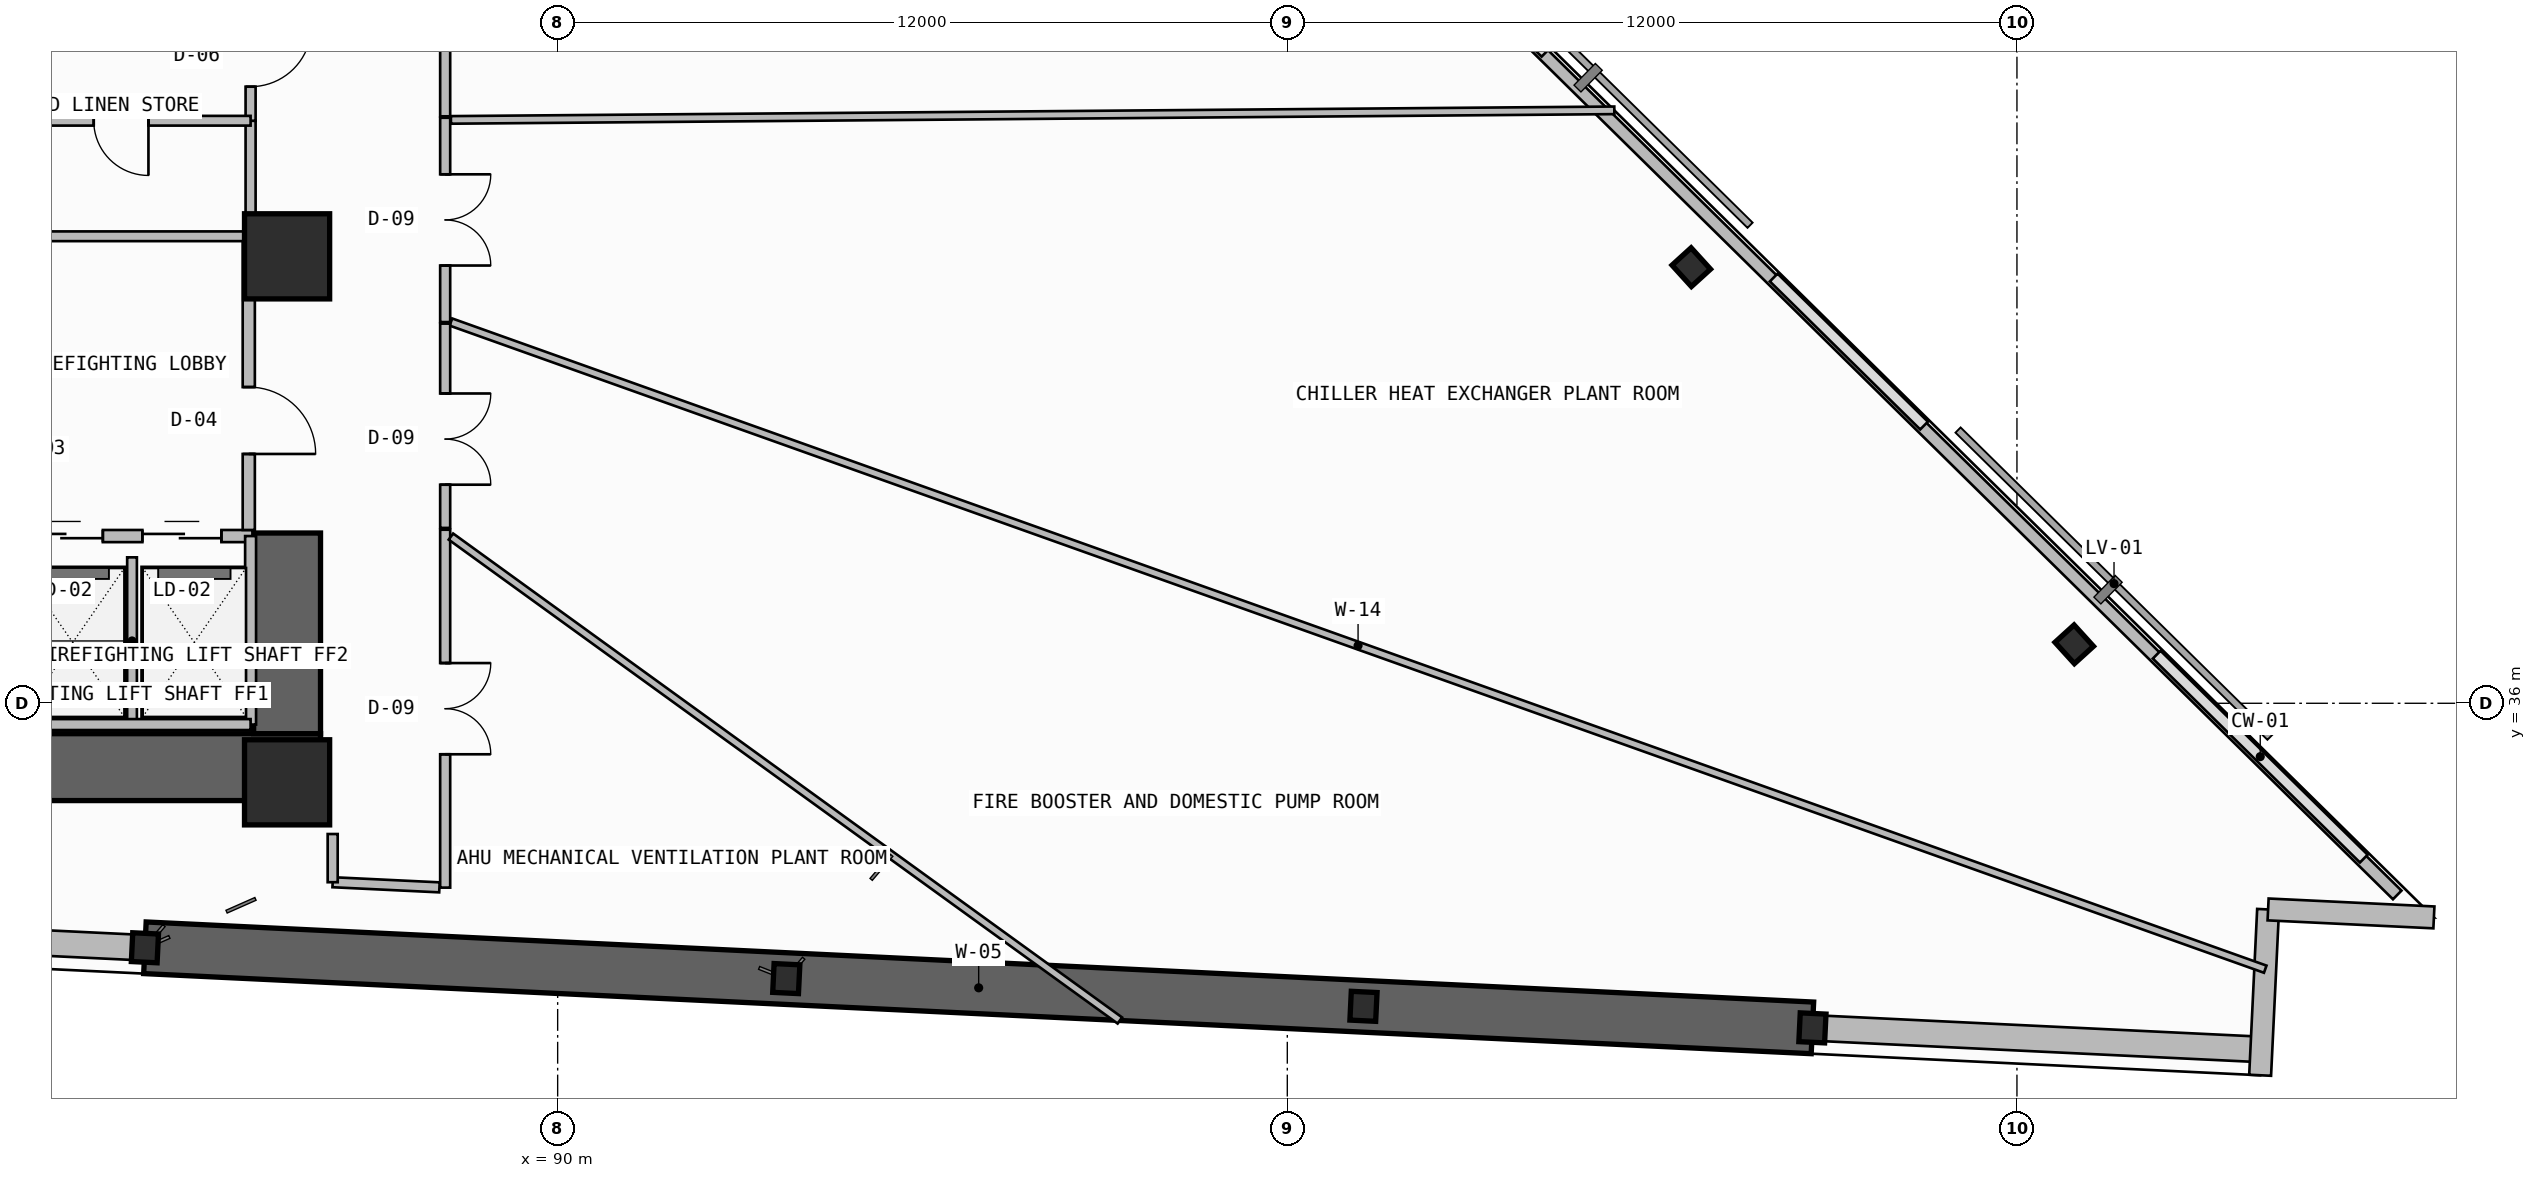
"""IFC4 building model, lengths in metres.
Left out: names, types, materials, properties, quantities, classifications, styles, units other than length and angle.
Written with IfcOpenShell. Run it as: python <this file> out.ifc"""

import sys

from ifc_helpers import new_model, si_unit, direction, frame, frame_2d, origin, origin_2d, place, context, subcontext, project, spatial, rectangle, i_section, extrude, element, fill, save


model = new_model("IFC4")
c1 = context("Model", 3, precision=1e-05, world=origin(), true_north=direction((0.0, 1.0)))
c2 = subcontext(c1, "Body", "Model", "MODEL_VIEW")
j1 = project(units=[si_unit("LENGTHUNIT", "METRE"), si_unit("PLANEANGLEUNIT", "RADIAN")], contexts=[c1])
p1 = place(None, origin())
s1 = spatial("IfcSite", under=j1, at=p1, CompositionType="ELEMENT")
p2 = place(p1, origin())
s2 = spatial("IfcBuilding", under=s1, at=p2, CompositionType="ELEMENT")
p3 = place(p2, frame((0.0, 0.0, 59.1)))
s3 = spatial("IfcBuildingStorey", under=s2, at=p3, CompositionType="ELEMENT", Elevation=59.1)
p4 = place(p3, frame((71.8, 34.95, -0.5), z_axis=(0.0, 0.0, 1.0), x_axis=(1.0, 0.0, 0.0)))
e1 = element("IfcWall", 1, at=p4, inside=s3, PredefinedType="SHEAR", context=c2, shape_type="SweptSolid", body=[
    extrude(rectangle(XDim=14.3, YDim=1.1, at=frame_2d((7.15, 0.0))), origin(), (0.0, 0.0, 1.0), 4.3),
])
p5 = place(p3, frame((85.55, 35.5, -0.5), z_axis=(0.0, 0.0, 1.0), x_axis=(0.0, 1.0, 0.0)))
e2 = element("IfcWall", 2, at=p5, inside=s3, PredefinedType="SHEAR", context=c2, shape_type="SweptSolid", body=[
    extrude(rectangle(XDim=3.3, YDim=1.1, at=frame_2d((1.65, 0.0))), origin(), (0.0, 0.0, 1.0), 4.3),
])
for number, where, z_axis, x_axis in (
    (3, (85.55, 34.7, 0.0), (0.0, 0.0, 1.0), (1.0, 0.0, 0.0)),
    (4, (85.55, 43.35, 0.0), (0.0, 0.0, 1.0), (1.0, 0.0, 0.0)),
):
    element("IfcColumn", number, at=place(p3, frame(where, z_axis=z_axis, x_axis=x_axis)), inside=s3, PredefinedType="COLUMN", context=c2, shape_type="SweptSolid", body=[
        extrude(rectangle(XDim=1.4, YDim=1.4, at=origin_2d()), origin(), (0.0, 0.0, 1.0), 4.2),
    ])
for number, where, z_axis, x_axis in (
    (5, (83.212, 31.979, 0.0), (0.0, 0.0, 1.0), (-0.999, 0.048, 0.0)),
    (6, (93.76, 31.472, 0.0), (0.0, 0.0, 1.0), (-0.999, 0.048, 0.0)),
    (7, (103.253, 31.017, 0.0), (0.0, 0.0, 1.0), (-0.999, 0.048, 0.0)),
    (8, (110.636, 30.662, 0.0), (0.0, 0.0, 1.0), (-0.999, 0.048, 0.0)),
    (9, (114.942, 36.97, 0.0), (0.0, 0.0, 1.0), (0.74, 0.672, 0.0)),
    (10, (108.644, 43.172, 0.0), (0.0, 0.0, 1.0), (0.74, 0.672, 0.0)),
):
    element("IfcColumn", number, at=place(p3, frame(where, z_axis=z_axis, x_axis=x_axis)), inside=s3, PredefinedType="COLUMN", context=c2, shape_type="SweptSolid", body=[
        extrude(i_section(OverallWidth=0.424, OverallDepth=0.474, WebThickness=0.048, FlangeThickness=0.077, FilletRadius=0.015, at=origin_2d()), origin(), (0.0, 0.0, 1.0), 4.2),
    ])
p6 = place(p3, frame((65.281, 32.841, 0.0), z_axis=(0.0, 0.0, 1.0), x_axis=(0.998848298084, -0.047979968897, 0.0)))
e11 = element("IfcWall", 11, at=p6, inside=s3, PredefinedType="SOLIDWALL", context=c2, shape_type="SweptSolid", body=[
    extrude(rectangle(XDim=17.952, YDim=0.42, at=frame_2d((8.976, 0.0))), origin(), (0.0, 0.0, 1.0), 2.777),
])
p7 = place(p3, frame((83.212, 31.979, -0.5), z_axis=(0.0, 0.0, 1.0), x_axis=(0.998848235141, -0.047981279227, 0.0)))
e12 = element("IfcWall", 12, at=p7, inside=s3, PredefinedType="SHEAR", context=c2, shape_type="SweptSolid", body=[
    extrude(rectangle(XDim=27.456, YDim=0.85, at=frame_2d((13.728, 0.0))), origin(), (0.0, 0.0, 1.0), 4.3),
])
p8 = place(p3, frame((110.636, 30.662, 0.0), z_axis=(0.0, 0.0, 1.0), x_axis=(0.998847872759, -0.047988822508, 0.0)))
e13 = element("IfcWall", 13, at=p8, inside=s3, PredefinedType="SOLIDWALL", context=c2, shape_type="SweptSolid", body=[
    extrude(rectangle(XDim=7.392, YDim=0.42, at=frame_2d((3.696, 0.0))), origin(), (0.0, 0.0, 1.0), 2.777),
])
for number, where, z_axis, x_axis in (
    (14, (118.0, 29.883, 0.0), (0.0, 0.0, 1.0), (0.048, 0.999, 0.0)),
    (15, (118.131, 32.61, 0.0), (0.0, 0.0, 1.0), (0.999, -0.048, 0.0)),
):
    element("IfcWall", number, at=place(p3, frame(where, z_axis=z_axis, x_axis=x_axis)), inside=s3, PredefinedType="SOLIDWALL", context=c2, shape_type="SweptSolid", body=[
        extrude(rectangle(XDim=2.73, YDim=0.36, at=frame_2d((1.365, 0.0))), origin(), (0.0, 0.0, 1.0), 3.8),
    ])
p9 = place(p3, frame((120.254, 32.848, 0.0), z_axis=(0.0, 0.0, 1.0), x_axis=(-0.71254385441, 0.701627576099, 0.0)))
e16 = element("IfcWall", 16, at=p9, inside=s3, PredefinedType="PARAPET", context=c2, shape_type="SweptSolid", body=[
    extrude(rectangle(XDim=36.142, YDim=0.2, at=frame_2d((18.071, 0.0))), origin(), (0.0, 0.0, 1.0), 1.15),
])
p10 = place(p3, frame((80.72, 38.75, 0.0), z_axis=(0.0, 0.0, 1.0), x_axis=(1.0, 0.0, 0.0)))
e17 = element("IfcWall", 17, at=p10, inside=s3, PredefinedType="SOLIDWALL", context=c2, shape_type="SweptSolid", body=[
    extrude(rectangle(XDim=4.26, YDim=0.2, at=frame_2d((2.13, 0.0))), origin(), (0.0, 0.0, 1.0), 3.8),
])
p11 = place(p10, frame((0.5, 0.0, 0.0)))
e18 = element("IfcOpeningElement", 18, at=p11, cuts=e17, PredefinedType="OPENING", context=c2, shape_type="SweptSolid", body=[
    extrude(rectangle(XDim=1.3, YDim=2.3, at=frame_2d((0.65, 1.15))), frame((0.0, 0.11, 0.0), z_axis=(0.0, -1.0, 0.0), x_axis=(1.0, 0.0, 0.0)), (0.0, 0.0, 1.0), 0.22),
])
p12 = place(p10, frame((2.45, 0.0, 0.0)))
e19 = element("IfcOpeningElement", 19, at=p12, cuts=e17, PredefinedType="OPENING", context=c2, shape_type="SweptSolid", body=[
    extrude(rectangle(XDim=1.3, YDim=2.3, at=frame_2d((0.65, 1.15))), frame((0.0, 0.11, 0.0), z_axis=(0.0, -1.0, 0.0), x_axis=(1.0, 0.0, 0.0)), (0.0, 0.0, 1.0), 0.22),
])
p13 = place(p3, frame((83.0, 35.65, 0.0), z_axis=(0.0, 0.0, 1.0), x_axis=(0.0, 1.0, 0.0)))
e20 = element("IfcWall", 20, at=p13, inside=s3, PredefinedType="PLUMBINGWALL", context=c2, shape_type="SweptSolid", body=[
    extrude(rectangle(XDim=2.75, YDim=0.16, at=frame_2d((1.375, 0.0))), origin(), (0.0, 0.0, 1.0), 3.8),
])
p14 = place(p3, frame((84.95, 35.65, 0.0), z_axis=(0.0, 0.0, 1.0), x_axis=(0.0, 1.0, 0.0)))
e21 = element("IfcWall", 21, at=p14, inside=s3, PredefinedType="SOLIDWALL", context=c2, shape_type="SweptSolid", body=[
    extrude(rectangle(XDim=3.1, YDim=0.18, at=frame_2d((1.55, 0.0))), origin(), (0.0, 0.0, 1.0), 3.8),
])
p15 = place(p3, frame((81.02, 35.65, 0.0), z_axis=(0.0, 0.0, 1.0), x_axis=(1.0, 0.0, 0.0)))
e22 = element("IfcWall", 22, at=p15, inside=s3, PredefinedType="SOLIDWALL", context=c2, shape_type="SweptSolid", body=[
    extrude(rectangle(XDim=3.93, YDim=0.18, at=frame_2d((1.965, 0.0))), origin(), (0.0, 0.0, 1.0), 3.8),
])
p16 = place(p3, frame((84.92, 38.85, 0.0), z_axis=(0.0, 0.0, 1.0), x_axis=(0.0, 1.0, 0.0)))
e23 = element("IfcWall", 23, at=p16, inside=s3, PredefinedType="SOLIDWALL", context=c2, shape_type="SweptSolid", body=[
    extrude(rectangle(XDim=4.83, YDim=0.2, at=frame_2d((2.415, 0.0))), origin(), (0.0, 0.0, 1.0), 3.8),
])
p17 = place(p16, frame((1.25, 0.0, 0.0)))
e24 = element("IfcOpeningElement", 24, at=p17, cuts=e23, PredefinedType="OPENING", context=c2, shape_type="SweptSolid", body=[
    extrude(rectangle(XDim=1.1, YDim=2.2, at=frame_2d((0.55, 1.1))), frame((0.0, 0.11, 0.0), z_axis=(0.0, -1.0, 0.0), x_axis=(1.0, 0.0, 0.0)), (0.0, 0.0, 1.0), 0.22),
])
p18 = place(p3, frame((84.95, 43.68, 0.0), z_axis=(0.0, 0.0, 1.0), x_axis=(0.0, 1.0, 0.0)))
e25 = element("IfcWall", 25, at=p18, inside=s3, PredefinedType="PLUMBINGWALL", context=c2, shape_type="SweptSolid", body=[
    extrude(rectangle(XDim=1.9, YDim=0.165, at=frame_2d((0.95, 0.0))), origin(), (0.0, 0.0, 1.0), 3.8),
])
p19 = place(p3, frame((84.95, 45.58, 0.0), z_axis=(0.0, 0.0, 1.0), x_axis=(0.0, 1.0, 0.0)))
e26 = element("IfcWall", 26, at=p19, inside=s3, PredefinedType="PARTITIONING", context=c2, shape_type="SweptSolid", body=[
    extrude(rectangle(XDim=2.12, YDim=0.165, at=frame_2d((1.06, 0.0))), origin(), (0.0, 0.0, 1.0), 3.8),
])
p20 = place(p19, frame((0.56, 0.0, 0.0)))
e27 = element("IfcOpeningElement", 27, at=p20, cuts=e26, PredefinedType="OPENING", context=c2, shape_type="SweptSolid", body=[
    extrude(rectangle(XDim=1.0, YDim=2.2, at=frame_2d((0.5, 1.1))), frame((0.0, 0.093, 0.0), z_axis=(0.0, -1.0, 0.0), x_axis=(1.0, 0.0, 0.0)), (0.0, 0.0, 1.0), 0.185),
])
p21 = place(p3, frame((80.72, 45.58, 0.0), z_axis=(0.0, 0.0, 1.0), x_axis=(1.0, 0.0, 0.0)))
e28 = element("IfcWall", 28, at=p21, inside=s3, PredefinedType="PLUMBINGWALL", context=c2, shape_type="SweptSolid", body=[
    extrude(rectangle(XDim=4.23, YDim=0.16, at=frame_2d((2.115, 0.0))), origin(), (0.0, 0.0, 1.0), 3.8),
])
p22 = place(p21, frame((1.65, 0.0, 0.0)))
e29 = element("IfcOpeningElement", 29, at=p22, cuts=e28, PredefinedType="OPENING", context=c2, shape_type="SweptSolid", body=[
    extrude(rectangle(XDim=0.9, YDim=2.1, at=frame_2d((0.45, 1.05))), frame((0.0, 0.09, 0.0), z_axis=(0.0, -1.0, 0.0), x_axis=(1.0, 0.0, 0.0)), (0.0, 0.0, 1.0), 0.18),
])
p23 = place(p3, frame((80.76, 43.68, 0.0), z_axis=(0.0, 0.0, 1.0), x_axis=(1.0, 0.0, 0.0)))
e30 = element("IfcWall", 30, at=p23, inside=s3, PredefinedType="PLUMBINGWALL", context=c2, shape_type="SweptSolid", body=[
    extrude(rectangle(XDim=4.19, YDim=0.16, at=frame_2d((2.095, 0.0))), origin(), (0.0, 0.0, 1.0), 3.8),
])
p24 = place(p3, frame((88.15, 32.969, 0.0), z_axis=(0.0, 0.0, 1.0), x_axis=(0.0, 1.0, 0.0)))
e31 = element("IfcWall", 31, at=p24, inside=s3, PredefinedType="PARTITIONING", context=c2, shape_type="SweptSolid", body=[
    extrude(rectangle(XDim=5.886, YDim=0.165, at=frame_2d((2.943, 0.0))), origin(), (0.0, 0.0, 1.0), 2.777),
])
p25 = place(p24, frame((2.193, 0.0, 0.0)))
e32 = element("IfcOpeningElement", 32, at=p25, cuts=e31, PredefinedType="OPENING", context=c2, shape_type="SweptSolid", body=[
    extrude(rectangle(XDim=1.5, YDim=2.25, at=frame_2d((0.75, 1.125))), frame((0.0, 0.093, 0.0), z_axis=(0.0, -1.0, 0.0), x_axis=(1.0, 0.0, 0.0)), (0.0, 0.0, 1.0), 0.185),
])
p26 = place(p3, frame((86.3, 33.057, 0.0), z_axis=(0.0, 0.0, 1.0), x_axis=(0.998844124848, -0.048066768734, 0.0)))
e33 = element("IfcWall", 33, at=p26, inside=s3, PredefinedType="PARTITIONING", context=c2, shape_type="SweptSolid", body=[
    extrude(rectangle(XDim=1.757, YDim=0.165, at=frame_2d((0.879, 0.0))), origin(), (0.0, 0.0, 1.0), 2.777),
])
p27 = place(p3, frame((86.3, 33.85, 0.0), z_axis=(0.0, 0.0, 1.0), x_axis=(0.0, -1.0, 0.0)))
e34 = element("IfcWall", 34, at=p27, inside=s3, PredefinedType="PARTITIONING", context=c2, shape_type="SweptSolid", body=[
    extrude(rectangle(XDim=0.793, YDim=0.165, at=frame_2d((0.396, 0.0))), origin(), (0.0, 0.0, 1.0), 2.777),
])
p28 = place(p3, frame((88.244, 38.741, 0.0), z_axis=(0.0, 0.0, 1.0), x_axis=(0.810248027695, -0.586087138245, 0.0)))
e35 = element("IfcWall", 35, at=p28, inside=s3, PredefinedType="PARTITIONING", context=c2, shape_type="SweptSolid", body=[
    extrude(rectangle(XDim=13.578, YDim=0.125, at=frame_2d((6.789, 0.0))), origin(), (0.0, 0.0, 1.0), 2.777),
])
p29 = place(p3, frame((88.15, 42.269, 0.0), z_axis=(0.0, 0.0, 1.0), x_axis=(0.0, 1.0, 0.0)))
e36 = element("IfcWall", 36, at=p29, inside=s3, PredefinedType="PARTITIONING", context=c2, shape_type="SweptSolid", body=[
    extrude(rectangle(XDim=3.36, YDim=0.165, at=frame_2d((1.68, 0.0))), origin(), (0.0, 0.0, 1.0), 2.777),
])
p30 = place(p29, frame((0.93, 0.0, 0.0)))
e37 = element("IfcOpeningElement", 37, at=p30, cuts=e36, PredefinedType="OPENING", context=c2, shape_type="SweptSolid", body=[
    extrude(rectangle(XDim=1.5, YDim=2.25, at=frame_2d((0.75, 1.125))), frame((0.0, 0.093, 0.0), z_axis=(0.0, -1.0, 0.0), x_axis=(1.0, 0.0, 0.0)), (0.0, 0.0, 1.0), 0.185),
])
p31 = place(p3, frame((118.083, 31.627, 0.0), z_axis=(0.0, 0.0, 1.0), x_axis=(-0.941883403833, 0.335939955326, 0.0)))
e38 = element("IfcWall", 38, at=p31, inside=s3, PredefinedType="PARTITIONING", context=c2, shape_type="SweptSolid", body=[
    extrude(rectangle(XDim=31.68, YDim=0.125, at=frame_2d((15.84, 0.0))), origin(), (0.0, 0.0, 1.0), 2.777),
])
p32 = place(p3, frame((88.244, 45.594, 0.0), z_axis=(0.0, 0.0, 1.0), x_axis=(0.999966031218, 0.008242354589, 0.0)))
e39 = element("IfcWall", 39, at=p32, inside=s3, PredefinedType="PARTITIONING", context=c2, shape_type="SweptSolid", body=[
    extrude(rectangle(XDim=19.135, YDim=0.125, at=frame_2d((9.567, 0.0))), origin(), (0.0, 0.0, 1.0), 2.777),
])
p33 = place(p3, frame((88.15, 38.884, 0.0), z_axis=(0.0, 0.0, 1.0), x_axis=(0.0, 1.0, 0.0)))
e40 = element("IfcWall", 40, at=p33, inside=s3, PredefinedType="PARTITIONING", context=c2, shape_type="SweptSolid", body=[
    extrude(rectangle(XDim=3.36, YDim=0.165, at=frame_2d((1.68, 0.0))), origin(), (0.0, 0.0, 1.0), 3.8),
])
p34 = place(p33, frame((0.711, 0.0, 0.0)))
e41 = element("IfcOpeningElement", 41, at=p34, cuts=e40, PredefinedType="OPENING", context=c2, shape_type="SweptSolid", body=[
    extrude(rectangle(XDim=1.5, YDim=2.25, at=frame_2d((0.75, 1.125))), frame((0.0, 0.093, 0.0), z_axis=(0.0, -1.0, 0.0), x_axis=(1.0, 0.0, 0.0)), (0.0, 0.0, 1.0), 0.185),
])
p35 = place(p3, frame((88.15, 45.653, 0.0), z_axis=(0.0, 0.0, 1.0), x_axis=(0.0, 1.0, 0.0)))
e42 = element("IfcWall", 42, at=p35, inside=s3, PredefinedType="PARTITIONING", context=c2, shape_type="SweptSolid", body=[
    extrude(rectangle(XDim=6.788, YDim=0.165, at=frame_2d((3.394, 0.0))), origin(), (0.0, 0.0, 1.0), 3.8),
])
p36 = place(p35, frame((2.644, 0.0, 0.0)))
e43 = element("IfcOpeningElement", 43, at=p36, cuts=e42, PredefinedType="OPENING", context=c2, shape_type="SweptSolid", body=[
    extrude(rectangle(XDim=1.5, YDim=2.25, at=frame_2d((0.75, 1.125))), frame((0.0, 0.093, 0.0), z_axis=(0.0, -1.0, 0.0), x_axis=(1.0, 0.0, 0.0)), (0.0, 0.0, 1.0), 0.185),
])
p37 = place(p11, origin())
e44 = element("IfcDoor", 44, at=p37, inside=s3, OperationType="DOUBLE_DOOR_SLIDING", PredefinedType="DOOR", context=c2, shape_type="SweptSolid", body=[
    extrude(rectangle(XDim=1.3, YDim=2.3, at=frame_2d((0.65, 1.15))), frame((0.0, 0.025, 0.0), z_axis=(0.0, -1.0, 0.0), x_axis=(1.0, 0.0, 0.0)), (0.0, 0.0, 1.0), 0.05),
])
fill(e18, e44)
p38 = place(p12, origin())
e45 = element("IfcDoor", 45, at=p38, inside=s3, OperationType="DOUBLE_DOOR_SLIDING", PredefinedType="DOOR", context=c2, shape_type="SweptSolid", body=[
    extrude(rectangle(XDim=1.3, YDim=2.3, at=frame_2d((0.65, 1.15))), frame((0.0, 0.025, 0.0), z_axis=(0.0, -1.0, 0.0), x_axis=(1.0, 0.0, 0.0)), (0.0, 0.0, 1.0), 0.05),
])
fill(e19, e45)
p39 = place(p17, frame((1.1, 0.0, 0.0), z_axis=(0.0, 0.0, 1.0), x_axis=(-1.0, 0.0, 0.0)))
e46 = element("IfcDoor", 46, at=p39, inside=s3, OperationType="SINGLE_SWING_RIGHT", PredefinedType="DOOR", context=c2, shape_type="SweptSolid", body=[
    extrude(rectangle(XDim=1.1, YDim=2.2, at=frame_2d((0.55, 1.1))), frame((0.0, 0.025, 0.0), z_axis=(0.0, -1.0, 0.0), x_axis=(1.0, 0.0, 0.0)), (0.0, 0.0, 1.0), 0.05),
])
fill(e24, e46)
p40 = place(p20, frame((1.0, 0.0, 0.0), z_axis=(0.0, 0.0, 1.0), x_axis=(-1.0, 0.0, 0.0)))
e47 = element("IfcDoor", 47, at=p40, inside=s3, OperationType="SINGLE_SWING_LEFT", PredefinedType="DOOR", context=c2, shape_type="SweptSolid", body=[
    extrude(rectangle(XDim=1.0, YDim=2.2, at=frame_2d((0.5, 1.1))), frame((0.0, 0.025, 0.0), z_axis=(0.0, -1.0, 0.0), x_axis=(1.0, 0.0, 0.0)), (0.0, 0.0, 1.0), 0.05),
])
fill(e27, e47)
p41 = place(p22, frame((0.9, 0.0, 0.0), z_axis=(0.0, 0.0, 1.0), x_axis=(-1.0, 0.0, 0.0)))
e48 = element("IfcDoor", 48, at=p41, inside=s3, OperationType="SINGLE_SWING_LEFT", PredefinedType="DOOR", context=c2, shape_type="SweptSolid", body=[
    extrude(rectangle(XDim=0.9, YDim=2.1, at=frame_2d((0.45, 1.05))), frame((0.0, 0.025, 0.0), z_axis=(0.0, -1.0, 0.0), x_axis=(1.0, 0.0, 0.0)), (0.0, 0.0, 1.0), 0.05),
])
fill(e29, e48)
p42 = place(p25, frame((1.5, 0.0, 0.0), z_axis=(0.0, 0.0, 1.0), x_axis=(-1.0, 0.0, 0.0)))
e49 = element("IfcDoor", 49, at=p42, inside=s3, OperationType="DOUBLE_DOOR_SINGLE_SWING", PredefinedType="DOOR", context=c2, shape_type="SweptSolid", body=[
    extrude(rectangle(XDim=1.5, YDim=2.25, at=frame_2d((0.75, 1.125))), frame((0.0, 0.025, 0.0), z_axis=(0.0, -1.0, 0.0), x_axis=(1.0, 0.0, 0.0)), (0.0, 0.0, 1.0), 0.05),
])
fill(e32, e49)
p43 = place(p30, frame((1.5, 0.0, 0.0), z_axis=(0.0, 0.0, 1.0), x_axis=(-1.0, 0.0, 0.0)))
e50 = element("IfcDoor", 50, at=p43, inside=s3, OperationType="DOUBLE_DOOR_SINGLE_SWING", PredefinedType="DOOR", context=c2, shape_type="SweptSolid", body=[
    extrude(rectangle(XDim=1.5, YDim=2.25, at=frame_2d((0.75, 1.125))), frame((0.0, 0.025, 0.0), z_axis=(0.0, -1.0, 0.0), x_axis=(1.0, 0.0, 0.0)), (0.0, 0.0, 1.0), 0.05),
])
fill(e37, e50)
p44 = place(p34, frame((1.5, 0.0, 0.0), z_axis=(0.0, 0.0, 1.0), x_axis=(-1.0, 0.0, 0.0)))
e51 = element("IfcDoor", 51, at=p44, inside=s3, OperationType="DOUBLE_DOOR_SINGLE_SWING", PredefinedType="DOOR", context=c2, shape_type="SweptSolid", body=[
    extrude(rectangle(XDim=1.5, YDim=2.25, at=frame_2d((0.75, 1.125))), frame((0.0, 0.025, 0.0), z_axis=(0.0, -1.0, 0.0), x_axis=(1.0, 0.0, 0.0)), (0.0, 0.0, 1.0), 0.05),
])
fill(e41, e51)
save(model, sys.argv[1])
